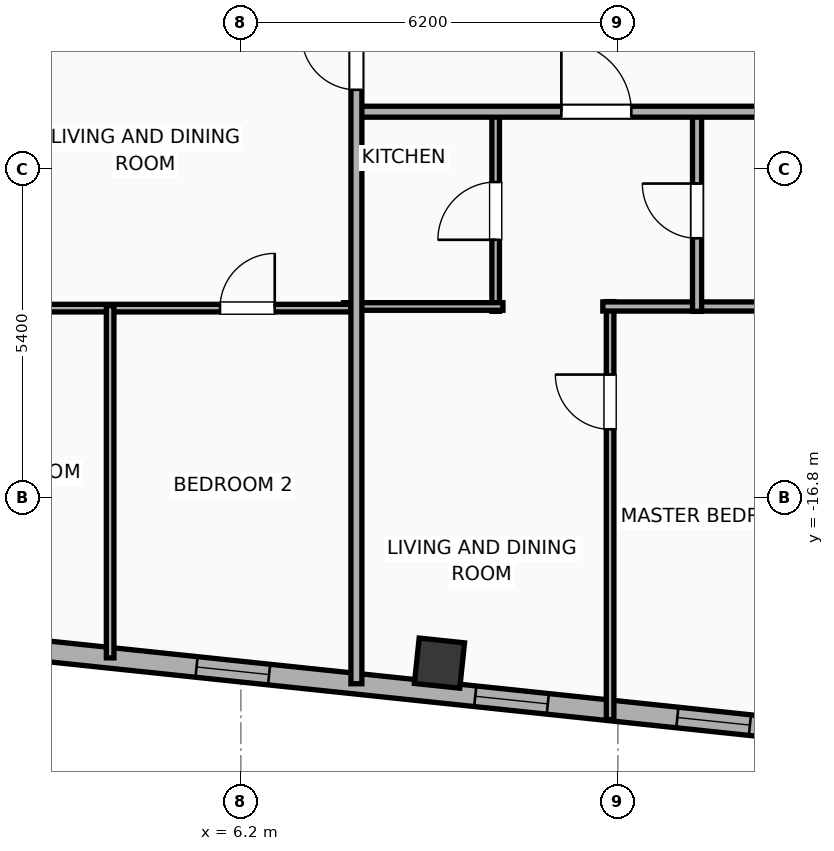
"""IFC4 building model, lengths in metres.
Left out: names, types, materials, properties, quantities, classifications, styles, units other than length and angle.
Written with IfcOpenShell. Run it as: python <this file> out.ifc"""

import sys

from ifc_helpers import new_model, si_unit, direction, frame, frame_2d, origin, origin_2d, place, context, subcontext, project, spatial, rectangle, hollow_rectangle, extrude, element, fill, save


model = new_model("IFC4")
c1 = context("Model", 3, precision=1e-05, world=origin(), true_north=direction((0.0, 1.0)))
c2 = subcontext(c1, "Body", "Model", "MODEL_VIEW")
j1 = project(units=[si_unit("LENGTHUNIT", "METRE"), si_unit("PLANEANGLEUNIT", "RADIAN")], contexts=[c1])
p1 = place(None, origin())
s1 = spatial("IfcSite", under=j1, at=p1, CompositionType="ELEMENT")
p2 = place(p1, origin())
s2 = spatial("IfcBuilding", under=s1, at=p2, CompositionType="ELEMENT")
p3 = place(p2, frame((0.0, 0.0, 306.8)))
s3 = spatial("IfcBuildingStorey", under=s2, at=p3, CompositionType="ELEMENT", Elevation=306.8)
p4 = place(p3, frame((9.466, -19.518, 0.0), z_axis=(0.0, 0.0, 1.0), x_axis=(0.994521895368, -0.104528463268, 0.0)))
e1 = element("IfcColumn", 1, at=p4, inside=s3, PredefinedType="COLUMN", context=c2, shape_type="SweptSolid", body=[
    extrude(hollow_rectangle(XDim=0.75, YDim=0.75, WallThickness=0.025, at=origin_2d()), origin(), (0.0, 0.0, 1.0), 3.865),
])
p5 = place(p3, frame((18.708, -20.972, 0.0), z_axis=(0.0, 0.0, 1.0), x_axis=(-0.994521888554, 0.104528528102, 0.0)))
e2 = element("IfcWall", 2, at=p5, inside=s3, PredefinedType="ELEMENTEDWALL", context=c2, shape_type="SweptSolid", body=[
    extrude(rectangle(XDim=46.766, YDim=0.34, at=frame_2d((23.383, 0.0))), origin(), (0.0, 0.0, 1.0), 2.39),
])
p6 = place(p5, frame((23.733, 0.0, 0.65)))
e3 = element("IfcOpeningElement", 3, at=p6, cuts=e2, PredefinedType="OPENING", context=c2, shape_type="SweptSolid", body=[
    extrude(rectangle(XDim=2.6, YDim=1.45, at=frame_2d((1.3, 0.725))), frame((0.0, 0.18, 0.0), z_axis=(0.0, -1.0, 0.0), x_axis=(1.0, 0.0, 0.0)), (0.0, 0.0, 1.0), 0.36),
])
p7 = place(p5, frame((44.402, 0.0, 0.55)))
e4 = element("IfcOpeningElement", 4, at=p7, cuts=e2, PredefinedType="OPENING", context=c2, shape_type="SweptSolid", body=[
    extrude(rectangle(XDim=1.2, YDim=1.15, at=frame_2d((0.6, 0.575))), frame((0.0, 0.18, 0.0), z_axis=(0.0, -1.0, 0.0), x_axis=(1.0, 0.0, 0.0)), (0.0, 0.0, 1.0), 0.36),
])
p8 = place(p5, frame((39.54, 0.0, 0.55)))
e5 = element("IfcOpeningElement", 5, at=p8, cuts=e2, PredefinedType="OPENING", context=c2, shape_type="SweptSolid", body=[
    extrude(rectangle(XDim=1.2, YDim=1.15, at=frame_2d((0.6, 0.575))), frame((0.0, 0.18, 0.0), z_axis=(0.0, -1.0, 0.0), x_axis=(1.0, 0.0, 0.0)), (0.0, 0.0, 1.0), 0.36),
])
p9 = place(p5, frame((42.406, 0.0, 0.55)))
e6 = element("IfcOpeningElement", 6, at=p9, cuts=e2, PredefinedType="OPENING", context=c2, shape_type="SweptSolid", body=[
    extrude(rectangle(XDim=1.2, YDim=1.15, at=frame_2d((0.6, 0.575))), frame((0.0, 0.18, 0.0), z_axis=(0.0, -1.0, 0.0), x_axis=(1.0, 0.0, 0.0)), (0.0, 0.0, 1.0), 0.36),
])
p10 = place(p5, frame((34.933, 0.0, 0.55)))
e7 = element("IfcOpeningElement", 7, at=p10, cuts=e2, PredefinedType="OPENING", context=c2, shape_type="SweptSolid", body=[
    extrude(rectangle(XDim=1.2, YDim=1.15, at=frame_2d((0.6, 0.575))), frame((0.0, 0.18, 0.0), z_axis=(0.0, -1.0, 0.0), x_axis=(1.0, 0.0, 0.0)), (0.0, 0.0, 1.0), 0.36),
])
p11 = place(p5, frame((28.631, 0.0, 0.55)))
e8 = element("IfcOpeningElement", 8, at=p11, cuts=e2, PredefinedType="OPENING", context=c2, shape_type="SweptSolid", body=[
    extrude(rectangle(XDim=1.2, YDim=1.15, at=frame_2d((0.6, 0.575))), frame((0.0, 0.18, 0.0), z_axis=(0.0, -1.0, 0.0), x_axis=(1.0, 0.0, 0.0)), (0.0, 0.0, 1.0), 0.36),
])
p12 = place(p5, frame((30.896, 0.0, 0.55)))
e9 = element("IfcOpeningElement", 9, at=p12, cuts=e2, PredefinedType="OPENING", context=c2, shape_type="SweptSolid", body=[
    extrude(rectangle(XDim=1.2, YDim=1.15, at=frame_2d((0.6, 0.575))), frame((0.0, 0.18, 0.0), z_axis=(0.0, -1.0, 0.0), x_axis=(1.0, 0.0, 0.0)), (0.0, 0.0, 1.0), 0.36),
])
p13 = place(p5, frame((7.501, 0.0, 0.55)))
e10 = element("IfcOpeningElement", 10, at=p13, cuts=e2, PredefinedType="OPENING", context=c2, shape_type="SweptSolid", body=[
    extrude(rectangle(XDim=1.2, YDim=1.15, at=frame_2d((0.6, 0.575))), frame((0.0, 0.18, 0.0), z_axis=(0.0, -1.0, 0.0), x_axis=(1.0, 0.0, 0.0)), (0.0, 0.0, 1.0), 0.36),
])
p14 = place(p5, frame((4.159, 0.0, 0.55)))
e11 = element("IfcOpeningElement", 11, at=p14, cuts=e2, PredefinedType="OPENING", context=c2, shape_type="SweptSolid", body=[
    extrude(rectangle(XDim=1.2, YDim=1.15, at=frame_2d((0.6, 0.575))), frame((0.0, 0.18, 0.0), z_axis=(0.0, -1.0, 0.0), x_axis=(1.0, 0.0, 0.0)), (0.0, 0.0, 1.0), 0.36),
])
p15 = place(p5, frame((1.369, 0.0, 0.55)))
e12 = element("IfcOpeningElement", 12, at=p15, cuts=e2, PredefinedType="OPENING", context=c2, shape_type="SweptSolid", body=[
    extrude(rectangle(XDim=1.2, YDim=1.15, at=frame_2d((0.6, 0.575))), frame((0.0, 0.18, 0.0), z_axis=(0.0, -1.0, 0.0), x_axis=(1.0, 0.0, 0.0)), (0.0, 0.0, 1.0), 0.36),
])
p16 = place(p5, frame((20.254, 0.0, 0.55)))
e13 = element("IfcOpeningElement", 13, at=p16, cuts=e2, PredefinedType="OPENING", context=c2, shape_type="SweptSolid", body=[
    extrude(rectangle(XDim=1.2, YDim=1.15, at=frame_2d((0.6, 0.575))), frame((0.0, 0.18, 0.0), z_axis=(0.0, -1.0, 0.0), x_axis=(1.0, 0.0, 0.0)), (0.0, 0.0, 1.0), 0.36),
])
p17 = place(p5, frame((16.172, 0.0, 0.55)))
e14 = element("IfcOpeningElement", 14, at=p17, cuts=e2, PredefinedType="OPENING", context=c2, shape_type="SweptSolid", body=[
    extrude(rectangle(XDim=1.2, YDim=1.15, at=frame_2d((0.6, 0.575))), frame((0.0, 0.18, 0.0), z_axis=(0.0, -1.0, 0.0), x_axis=(1.0, 0.0, 0.0)), (0.0, 0.0, 1.0), 0.36),
])
p18 = place(p5, frame((12.11, 0.0, 0.55)))
e15 = element("IfcOpeningElement", 15, at=p18, cuts=e2, PredefinedType="OPENING", context=c2, shape_type="SweptSolid", body=[
    extrude(rectangle(XDim=1.2, YDim=1.15, at=frame_2d((0.6, 0.575))), frame((0.0, 0.18, 0.0), z_axis=(0.0, -1.0, 0.0), x_axis=(1.0, 0.0, 0.0)), (0.0, 0.0, 1.0), 0.36),
])
p19 = place(p3, frame((12.272, -20.447, 0.0), z_axis=(0.0, 0.0, 1.0), x_axis=(0.0, 1.0, 0.0)))
e16 = element("IfcWall", 16, at=p19, inside=s3, PredefinedType="PARTITIONING", context=c2, shape_type="SweptSolid", body=[
    extrude(rectangle(XDim=6.874, YDim=0.125, at=frame_2d((3.437, 0.0))), origin(), (0.0, 0.0, 1.0), 3.5),
])
p20 = place(p19, frame((4.774, 0.0, 0.0)))
e17 = element("IfcOpeningElement", 17, at=p20, cuts=e16, PredefinedType="OPENING", context=c2, shape_type="SweptSolid", body=[
    extrude(rectangle(XDim=0.9, YDim=2.05, at=frame_2d((0.45, 1.025))), frame((0.0, 0.073, 0.0), z_axis=(0.0, -1.0, 0.0), x_axis=(1.0, 0.0, 0.0)), (0.0, 0.0, 1.0), 0.145),
])
p21 = place(p3, frame((12.152, -13.653, 0.0), z_axis=(0.0, 0.0, 1.0), x_axis=(1.0, 0.0, 0.0)))
e18 = element("IfcWall", 18, at=p21, inside=s3, PredefinedType="PLUMBINGWALL", context=c2, shape_type="SweptSolid", body=[
    extrude(rectangle(XDim=3.605, YDim=0.15, at=frame_2d((1.802, 0.0))), origin(), (0.0, 0.0, 1.0), 3.5),
])
p22 = place(p3, frame((10.39, -13.733, 0.0), z_axis=(0.0, 0.0, 1.0), x_axis=(0.0, 1.0, 0.0)))
e19 = element("IfcWall", 19, at=p22, inside=s3, PredefinedType="PARTITIONING", context=c2, shape_type="SweptSolid", body=[
    extrude(rectangle(XDim=3.303, YDim=0.125, at=frame_2d((1.651, 0.0))), origin(), (0.0, 0.0, 1.0), 2.39),
])
p23 = place(p22, frame((1.177, 0.0, 0.0)))
e20 = element("IfcOpeningElement", 20, at=p23, cuts=e19, PredefinedType="OPENING", context=c2, shape_type="SweptSolid", body=[
    extrude(rectangle(XDim=0.95, YDim=2.05, at=frame_2d((0.475, 1.025))), frame((0.0, 0.073, 0.0), z_axis=(0.0, -1.0, 0.0), x_axis=(1.0, 0.0, 0.0)), (0.0, 0.0, 1.0), 0.145),
])
p24 = place(p3, frame((7.887, -13.653, 0.0), z_axis=(0.0, 0.0, 1.0), x_axis=(1.0, 0.0, 0.0)))
e21 = element("IfcWall", 21, at=p24, inside=s3, PredefinedType="PARTITIONING", context=c2, shape_type="SweptSolid", body=[
    extrude(rectangle(XDim=2.623, YDim=0.125, at=frame_2d((1.311, 0.0))), origin(), (0.0, 0.0, 1.0), 3.5),
])
p25 = place(p3, frame((13.702, -13.733, 0.0), z_axis=(0.0, 0.0, 1.0), x_axis=(0.0, 1.0, 0.0)))
e22 = element("IfcWall", 22, at=p25, inside=s3, PredefinedType="PLUMBINGWALL", context=c2, shape_type="SweptSolid", body=[
    extrude(rectangle(XDim=3.303, YDim=0.15, at=frame_2d((1.651, 0.0))), origin(), (0.0, 0.0, 1.0), 3.5),
])
p26 = place(p25, frame((1.201, 0.0, 0.0)))
e23 = element("IfcOpeningElement", 23, at=p26, cuts=e22, PredefinedType="OPENING", context=c2, shape_type="SweptSolid", body=[
    extrude(rectangle(XDim=0.9, YDim=2.05, at=frame_2d((0.45, 1.025))), frame((0.0, 0.085, 0.0), z_axis=(0.0, -1.0, 0.0), x_axis=(1.0, 0.0, 0.0)), (0.0, 0.0, 1.0), 0.17),
])
p27 = place(p3, frame((8.08, -10.45, 0.0), z_axis=(0.0, 0.0, 1.0), x_axis=(1.0, 0.0, 0.0)))
e24 = element("IfcWall", 24, at=p27, inside=s3, PredefinedType="PARTITIONING", context=c2, shape_type="SweptSolid", body=[
    extrude(rectangle(XDim=15.199, YDim=0.18, at=frame_2d((7.6, 0.0))), origin(), (0.0, 0.0, 1.0), 3.5),
])
p28 = place(p27, frame((3.39, 0.0, 0.0)))
e25 = element("IfcOpeningElement", 25, at=p28, cuts=e24, PredefinedType="OPENING", context=c2, shape_type="SweptSolid", body=[
    extrude(rectangle(XDim=1.15, YDim=2.05, at=frame_2d((0.575, 1.025))), frame((0.0, 0.1, 0.0), z_axis=(0.0, -1.0, 0.0), x_axis=(1.0, 0.0, 0.0)), (0.0, 0.0, 1.0), 0.2),
])
p29 = place(p27, frame((11.024, 0.0, 0.0)))
e26 = element("IfcOpeningElement", 26, at=p29, cuts=e24, PredefinedType="OPENING", context=c2, shape_type="SweptSolid", body=[
    extrude(rectangle(XDim=1.15, YDim=2.05, at=frame_2d((0.575, 1.025))), frame((0.0, 0.1, 0.0), z_axis=(0.0, -1.0, 0.0), x_axis=(1.0, 0.0, 0.0)), (0.0, 0.0, 1.0), 0.2),
])
p30 = place(p3, frame((0.02, -13.68, 0.0), z_axis=(0.0, 0.0, 1.0), x_axis=(1.0, 0.0, 0.0)))
e27 = element("IfcWall", 27, at=p30, inside=s3, PredefinedType="PARTITIONING", context=c2, shape_type="SweptSolid", body=[
    extrude(rectangle(XDim=7.992, YDim=0.125, at=frame_2d((3.996, 0.0))), origin(), (0.0, 0.0, 1.0), 3.5),
])
p31 = place(p30, frame((1.323, 0.0, 0.0)))
e28 = element("IfcOpeningElement", 28, at=p31, cuts=e27, PredefinedType="OPENING", context=c2, shape_type="SweptSolid", body=[
    extrude(rectangle(XDim=0.9, YDim=2.05, at=frame_2d((0.45, 1.025))), frame((0.0, 0.073, 0.0), z_axis=(0.0, -1.0, 0.0), x_axis=(1.0, 0.0, 0.0)), (0.0, 0.0, 1.0), 0.145),
])
p32 = place(p30, frame((5.837, 0.0, 0.0)))
e29 = element("IfcOpeningElement", 29, at=p32, cuts=e27, PredefinedType="OPENING", context=c2, shape_type="SweptSolid", body=[
    extrude(rectangle(XDim=0.9, YDim=2.05, at=frame_2d((0.45, 1.025))), frame((0.0, 0.073, 0.0), z_axis=(0.0, -1.0, 0.0), x_axis=(1.0, 0.0, 0.0)), (0.0, 0.0, 1.0), 0.145),
])
p33 = place(p3, frame((4.05, -19.432, 0.0), z_axis=(0.0, 0.0, 1.0), x_axis=(0.0, 1.0, 0.0)))
e30 = element("IfcWall", 30, at=p33, inside=s3, PredefinedType="PARTITIONING", context=c2, shape_type="SweptSolid", body=[
    extrude(rectangle(XDim=5.792, YDim=0.125, at=frame_2d((2.896, 0.0))), origin(), (0.0, 0.0, 1.0), 3.5),
])
p34 = place(p3, frame((8.1, -19.857, 0.0), z_axis=(0.0, 0.0, 1.0), x_axis=(0.0, 1.0, 0.0)))
e31 = element("IfcWall", 31, at=p34, inside=s3, PredefinedType="PARTITIONING", context=c2, shape_type="SweptSolid", body=[
    extrude(rectangle(XDim=11.017, YDim=0.18, at=frame_2d((5.509, 0.0))), origin(), (0.0, 0.0, 1.0), 3.5),
])
p35 = place(p34, frame((9.767, 0.0, 0.0)))
e32 = element("IfcOpeningElement", 32, at=p35, cuts=e31, PredefinedType="OPENING", context=c2, shape_type="SweptSolid", body=[
    extrude(rectangle(XDim=0.9, YDim=2.05, at=frame_2d((0.45, 1.025))), frame((0.0, 0.1, 0.0), z_axis=(0.0, -1.0, 0.0), x_axis=(1.0, 0.0, 0.0)), (0.0, 0.0, 1.0), 0.2),
])
p36 = place(p13, origin())
e33 = element("IfcWindow", 33, at=p36, inside=s3, PartitioningType="SINGLE_PANEL", PredefinedType="WINDOW", context=c2, shape_type="SweptSolid", body=[
    extrude(rectangle(XDim=1.2, YDim=1.15, at=frame_2d((0.6, 0.575))), frame((0.0, 0.03, 0.0), z_axis=(0.0, -1.0, 0.0), x_axis=(1.0, 0.0, 0.0)), (0.0, 0.0, 1.0), 0.06),
])
fill(e10, e33)
p37 = place(p14, origin())
e34 = element("IfcWindow", 34, at=p37, inside=s3, PartitioningType="SINGLE_PANEL", PredefinedType="WINDOW", context=c2, shape_type="SweptSolid", body=[
    extrude(rectangle(XDim=1.2, YDim=1.15, at=frame_2d((0.6, 0.575))), frame((0.0, 0.03, 0.0), z_axis=(0.0, -1.0, 0.0), x_axis=(1.0, 0.0, 0.0)), (0.0, 0.0, 1.0), 0.06),
])
fill(e11, e34)
p38 = place(p18, origin())
e35 = element("IfcWindow", 35, at=p38, inside=s3, PartitioningType="SINGLE_PANEL", PredefinedType="WINDOW", context=c2, shape_type="SweptSolid", body=[
    extrude(rectangle(XDim=1.2, YDim=1.15, at=frame_2d((0.6, 0.575))), frame((0.0, 0.03, 0.0), z_axis=(0.0, -1.0, 0.0), x_axis=(1.0, 0.0, 0.0)), (0.0, 0.0, 1.0), 0.06),
])
fill(e15, e35)
p39 = place(p20, origin())
e36 = element("IfcDoor", 36, at=p39, inside=s3, OperationType="SINGLE_SWING_RIGHT", PredefinedType="DOOR", context=c2, shape_type="SweptSolid", body=[
    extrude(rectangle(XDim=0.9, YDim=2.05, at=frame_2d((0.45, 1.025))), frame((0.0, 0.025, 0.0), z_axis=(0.0, -1.0, 0.0), x_axis=(1.0, 0.0, 0.0)), (0.0, 0.0, 1.0), 0.05),
])
fill(e17, e36)
p40 = place(p23, origin())
e37 = element("IfcDoor", 37, at=p40, inside=s3, OperationType="SINGLE_SWING_LEFT", PredefinedType="DOOR", context=c2, shape_type="SweptSolid", body=[
    extrude(rectangle(XDim=0.95, YDim=2.05, at=frame_2d((0.475, 1.025))), frame((0.0, 0.025, 0.0), z_axis=(0.0, -1.0, 0.0), x_axis=(1.0, 0.0, 0.0)), (0.0, 0.0, 1.0), 0.05),
])
fill(e20, e37)
p41 = place(p26, origin())
e38 = element("IfcDoor", 38, at=p41, inside=s3, OperationType="SINGLE_SWING_RIGHT", PredefinedType="DOOR", context=c2, shape_type="SweptSolid", body=[
    extrude(rectangle(XDim=0.9, YDim=2.05, at=frame_2d((0.45, 1.025))), frame((0.0, 0.025, 0.0), z_axis=(0.0, -1.0, 0.0), x_axis=(1.0, 0.0, 0.0)), (0.0, 0.0, 1.0), 0.05),
])
fill(e23, e38)
p42 = place(p28, origin())
e39 = element("IfcDoor", 39, at=p42, inside=s3, OperationType="SINGLE_SWING_LEFT", PredefinedType="DOOR", context=c2, shape_type="SweptSolid", body=[
    extrude(rectangle(XDim=1.15, YDim=2.05, at=frame_2d((0.575, 1.025))), frame((0.0, 0.025, 0.0), z_axis=(0.0, -1.0, 0.0), x_axis=(1.0, 0.0, 0.0)), (0.0, 0.0, 1.0), 0.05),
])
fill(e25, e39)
p43 = place(p32, origin())
e40 = element("IfcDoor", 40, at=p43, inside=s3, OperationType="SINGLE_SWING_RIGHT", PredefinedType="DOOR", context=c2, shape_type="SweptSolid", body=[
    extrude(rectangle(XDim=0.9, YDim=2.05, at=frame_2d((0.45, 1.025))), frame((0.0, 0.025, 0.0), z_axis=(0.0, -1.0, 0.0), x_axis=(1.0, 0.0, 0.0)), (0.0, 0.0, 1.0), 0.05),
])
fill(e29, e40)
p44 = place(p35, origin())
e41 = element("IfcDoor", 41, at=p44, inside=s3, OperationType="SINGLE_SWING_RIGHT", PredefinedType="DOOR", context=c2, shape_type="SweptSolid", body=[
    extrude(rectangle(XDim=0.9, YDim=2.05, at=frame_2d((0.45, 1.025))), frame((0.0, 0.025, 0.0), z_axis=(0.0, -1.0, 0.0), x_axis=(1.0, 0.0, 0.0)), (0.0, 0.0, 1.0), 0.05),
])
fill(e32, e41)
save(model, sys.argv[1])
